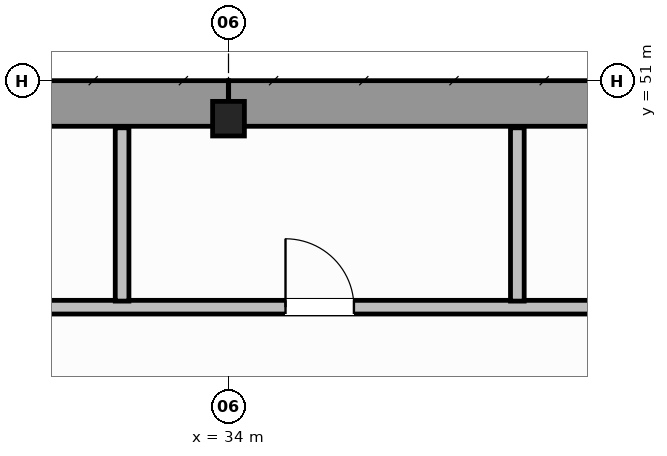
"""IFC4 building model, lengths in metres.
Left out: names, types, materials, properties, quantities, classifications, styles, units other than length and angle.
Written with IfcOpenShell. Run it as: python <this file> out.ifc"""

import sys

from ifc_helpers import new_model, si_unit, direction, frame, frame_2d, origin, origin_2d, place, context, subcontext, project, spatial, rectangle, i_section, extrude, source, transform, mapped, element, fill, save


model = new_model("IFC4")
c1 = context("Model", 3, precision=1e-05, world=origin(), true_north=direction((0.0, 1.0)))
c2 = subcontext(c1, "Body", "Model", "MODEL_VIEW")
j1 = project(units=[si_unit("LENGTHUNIT", "METRE"), si_unit("PLANEANGLEUNIT", "RADIAN")], contexts=[c1])
p1 = place(None, origin())
s1 = spatial("IfcSite", under=j1, at=p1, CompositionType="ELEMENT")
p2 = place(p1, origin())
s2 = spatial("IfcBuilding", under=s1, at=p2, CompositionType="ELEMENT")
p3 = place(p2, frame((0.0, 0.0, 218.4)))
s3 = spatial("IfcBuildingStorey", under=s2, at=p3, CompositionType="ELEMENT", Elevation=218.4)
m1 = source(origin(), c2, "Body", "SweptSolid", [
    extrude(i_section(OverallWidth=0.418, OverallDepth=0.455, WebThickness=0.042, FlangeThickness=0.058, FilletRadius=0.015, at=origin_2d()), origin(), (0.0, 0.0, 1.0), 4.8),
])
p4 = place(p3, frame((34.0, 50.5, 0.0), z_axis=(0.0, 0.0, 1.0), x_axis=(1.0, 0.0, 0.0)))
e1 = element("IfcColumn", 1, at=p4, inside=s3, PredefinedType="COLUMN", context=c2, shape_type="MappedRepresentation", body=[
    mapped(m1, transform((0.0, 0.0, 0.0), scale=1.0)),
])
for number, where, z_axis, x_axis in (
    (2, (14.304, 50.7, 0.0), (0.0, 0.0, 1.0), (1.0, 0.0, 0.0)),
    (3, (34.002, 50.7, 0.0), (0.0, 0.0, 1.0), (1.0, 0.0, 0.0)),
):
    element("IfcWall", number, at=place(p3, frame(where, z_axis=z_axis, x_axis=x_axis)), inside=s3, PredefinedType="SHEAR", context=c2, shape_type="SweptSolid", body=[
        extrude(rectangle(XDim=19.694, YDim=0.6, at=frame_2d((9.847, 0.0))), origin(), (0.0, 0.0, 1.0), 4.8),
    ])
p5 = place(p3, frame((18.62, 48.02, 0.0), z_axis=(0.0, 0.0, 1.0), x_axis=(1.0, 0.0, 0.0)))
e4 = element("IfcWall", 4, at=p5, inside=s3, PredefinedType="PLUMBINGWALL", context=c2, shape_type="SweptSolid", body=[
    extrude(rectangle(XDim=30.76, YDim=0.18, at=frame_2d((15.38, 0.0))), origin(), (0.0, 0.0, 1.0), 4.54),
])
p6 = place(p5, frame((1.655, 0.0, 0.0)))
e5 = element("IfcOpeningElement", 5, at=p6, cuts=e4, PredefinedType="OPENING", context=c2, shape_type="SweptSolid", body=[
    extrude(rectangle(XDim=0.9, YDim=2.15, at=frame_2d((0.45, 1.075))), frame((0.0, 0.1, 0.0), z_axis=(0.0, -1.0, 0.0), x_axis=(1.0, 0.0, 0.0)), (0.0, 0.0, 1.0), 0.2),
])
p7 = place(p5, frame((6.03, 0.0, 0.0)))
e6 = element("IfcOpeningElement", 6, at=p7, cuts=e4, PredefinedType="OPENING", context=c2, shape_type="SweptSolid", body=[
    extrude(rectangle(XDim=0.9, YDim=2.15, at=frame_2d((0.45, 1.075))), frame((0.0, 0.1, 0.0), z_axis=(0.0, -1.0, 0.0), x_axis=(1.0, 0.0, 0.0)), (0.0, 0.0, 1.0), 0.2),
])
p8 = place(p5, frame((10.93, 0.0, 0.0)))
e7 = element("IfcOpeningElement", 7, at=p8, cuts=e4, PredefinedType="OPENING", context=c2, shape_type="SweptSolid", body=[
    extrude(rectangle(XDim=0.9, YDim=2.15, at=frame_2d((0.45, 1.075))), frame((0.0, 0.1, 0.0), z_axis=(0.0, -1.0, 0.0), x_axis=(1.0, 0.0, 0.0)), (0.0, 0.0, 1.0), 0.2),
])
p9 = place(p5, frame((16.13, 0.0, 0.0)))
e8 = element("IfcOpeningElement", 8, at=p9, cuts=e4, PredefinedType="OPENING", context=c2, shape_type="SweptSolid", body=[
    extrude(rectangle(XDim=0.9, YDim=2.15, at=frame_2d((0.45, 1.075))), frame((0.0, 0.1, 0.0), z_axis=(0.0, -1.0, 0.0), x_axis=(1.0, 0.0, 0.0)), (0.0, 0.0, 1.0), 0.2),
])
p10 = place(p5, frame((21.73, 0.0, 0.0)))
e9 = element("IfcOpeningElement", 9, at=p10, cuts=e4, PredefinedType="OPENING", context=c2, shape_type="SweptSolid", body=[
    extrude(rectangle(XDim=0.9, YDim=2.15, at=frame_2d((0.45, 1.075))), frame((0.0, 0.1, 0.0), z_axis=(0.0, -1.0, 0.0), x_axis=(1.0, 0.0, 0.0)), (0.0, 0.0, 1.0), 0.2),
])
p11 = place(p5, frame((27.505, 0.0, 0.0)))
e10 = element("IfcOpeningElement", 10, at=p11, cuts=e4, PredefinedType="OPENING", context=c2, shape_type="SweptSolid", body=[
    extrude(rectangle(XDim=0.9, YDim=2.15, at=frame_2d((0.45, 1.075))), frame((0.0, 0.1, 0.0), z_axis=(0.0, -1.0, 0.0), x_axis=(1.0, 0.0, 0.0)), (0.0, 0.0, 1.0), 0.2),
])
for number, where, z_axis, x_axis in (
    (11, (32.6, 48.1, 0.0), (0.0, 0.0, 1.0), (0.0, 1.0, 0.0)),
    (12, (37.8, 48.1, 0.0), (0.0, 0.0, 1.0), (0.0, 1.0, 0.0)),
):
    element("IfcWall", number, at=place(p3, frame(where, z_axis=z_axis, x_axis=x_axis)), inside=s3, PredefinedType="PLUMBINGWALL", context=c2, shape_type="SweptSolid", body=[
        extrude(rectangle(XDim=2.28, YDim=0.18, at=frame_2d((1.14, 0.0))), origin(), (0.0, 0.0, 1.0), 4.54),
    ])
m2 = source(origin(), c2, "Body", "SweptSolid", [
    extrude(rectangle(XDim=0.9, YDim=2.15, at=frame_2d((0.45, 1.075))), frame((0.0, 0.025, 0.0), z_axis=(0.0, -1.0, 0.0), x_axis=(1.0, 0.0, 0.0)), (0.0, 0.0, 1.0), 0.05),
])
p12 = place(p9, origin())
e13 = element("IfcDoor", 13, at=p12, inside=s3, OperationType="SINGLE_SWING_RIGHT", PredefinedType="DOOR", context=c2, shape_type="MappedRepresentation", body=[
    mapped(m2, transform((0.0, 0.0, 0.0), scale=1.0)),
])
fill(e8, e13)
save(model, sys.argv[1])
